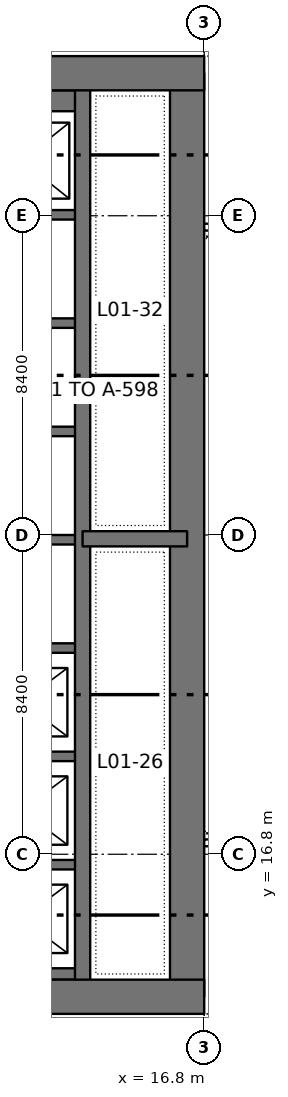
"""IFC4 building model, lengths in metres.
Left out: names, types, materials, properties, quantities, classifications, styles, units other than length and angle.
Written with IfcOpenShell. Run it as: python <this file> out.ifc"""

import sys

from ifc_helpers import new_model, si_unit, direction, frame, frame_2d, origin, place, context, subcontext, project, spatial, rectangle, extrude, element, save


model = new_model("IFC4")
c1 = context("Model", 3, precision=1e-05, world=origin(), true_north=direction((0.0, 1.0)))
c2 = subcontext(c1, "Body", "Model", "MODEL_VIEW")
j1 = project(units=[si_unit("LENGTHUNIT", "METRE"), si_unit("PLANEANGLEUNIT", "RADIAN")], contexts=[c1])
p1 = place(None, origin())
s1 = spatial("IfcSite", under=j1, at=p1, CompositionType="ELEMENT")
p2 = place(p1, origin())
s2 = spatial("IfcBuilding", under=s1, at=p2, CompositionType="ELEMENT")
p3 = place(p2, frame((0.0, 0.0, 5.4)))
s3 = spatial("IfcBuildingStorey", under=s2, at=p3, CompositionType="ELEMENT", Elevation=5.4)
p4 = place(p3, frame((-1.2, 13.05, 0.0), z_axis=(0.0, 0.0, 1.0), x_axis=(1.0, 0.0, 0.0)))
e1 = element("IfcWall", 1, at=p4, inside=s3, PredefinedType="SHEAR", context=c2, shape_type="SweptSolid", body=[
    extrude(rectangle(XDim=18.0, YDim=0.9, at=frame_2d((9.0, 0.0))), origin(), (0.0, 0.0, 1.0), 4.5),
])
p5 = place(p4, frame((8.95, 0.0, 0.0)))
e2 = element("IfcOpeningElement", 2, at=p5, cuts=e1, PredefinedType="OPENING", context=c2, shape_type="SweptSolid", body=[
    extrude(rectangle(XDim=1.8, YDim=2.4, at=frame_2d((0.9, 1.2))), frame((0.0, 0.46, 0.0), z_axis=(0.0, -1.0, 0.0), x_axis=(1.0, 0.0, 0.0)), (0.0, 0.0, 1.0), 0.92),
])
p6 = place(p3, frame((-1.2, 37.35, 0.0), z_axis=(0.0, 0.0, 1.0), x_axis=(1.0, 0.0, 0.0)))
e3 = element("IfcWall", 3, at=p6, inside=s3, PredefinedType="SHEAR", context=c2, shape_type="SweptSolid", body=[
    extrude(rectangle(XDim=18.0, YDim=0.9, at=frame_2d((9.0, 0.0))), origin(), (0.0, 0.0, 1.0), 4.5),
])
p7 = place(p6, frame((8.95, 0.0, 0.0)))
e4 = element("IfcOpeningElement", 4, at=p7, cuts=e3, PredefinedType="OPENING", context=c2, shape_type="SweptSolid", body=[
    extrude(rectangle(XDim=1.8, YDim=2.4, at=frame_2d((0.9, 1.2))), frame((0.0, 0.46, 0.0), z_axis=(0.0, -1.0, 0.0), x_axis=(1.0, 0.0, 0.0)), (0.0, 0.0, 1.0), 0.92),
])
p8 = place(p3, frame((16.35, 13.05, 0.0), z_axis=(0.0, 0.0, 1.0), x_axis=(0.0, 1.0, 0.0)))
e5 = element("IfcWall", 5, at=p8, inside=s3, PredefinedType="SHEAR", context=c2, shape_type="SweptSolid", body=[
    extrude(rectangle(XDim=24.3, YDim=0.9, at=frame_2d((12.15, 0.0))), origin(), (0.0, 0.0, 1.0), 4.5),
])
p9 = place(p3, frame((13.6, 13.05, 0.0), z_axis=(0.0, 0.0, 1.0), x_axis=(0.0, 1.0, 0.0)))
e6 = element("IfcWall", 6, at=p9, inside=s3, PredefinedType="SHEAR", context=c2, shape_type="SweptSolid", body=[
    extrude(rectangle(XDim=24.3, YDim=0.4, at=frame_2d((12.15, 0.0))), origin(), (0.0, 0.0, 1.0), 4.5),
])
p10 = place(p3, frame((13.6, 25.1, 0.0), z_axis=(0.0, 0.0, 1.0), x_axis=(1.0, 0.0, 0.0)))
e7 = element("IfcWall", 7, at=p10, inside=s3, PredefinedType="SHEAR", context=c2, shape_type="SweptSolid", body=[
    extrude(rectangle(XDim=2.75, YDim=0.4, at=frame_2d((1.375, 0.0))), origin(), (0.0, 0.0, 1.0), 4.5),
])
p11 = place(p3, frame((10.4, 13.65, 0.0), z_axis=(0.0, 0.0, 1.0), x_axis=(1.0, 0.0, 0.0)))
e8 = element("IfcWall", 8, at=p11, inside=s3, PredefinedType="SHEAR", context=c2, shape_type="SweptSolid", body=[
    extrude(rectangle(XDim=3.2, YDim=0.3, at=frame_2d((1.6, 0.0))), origin(), (0.0, 0.0, 1.0), 4.5),
])
for number, where, z_axis, x_axis in (
    (9, (10.4, 16.525, 0.0), (0.0, 0.0, 1.0), (1.0, 0.0, 0.0)),
    (10, (10.4, 19.375, 0.0), (0.0, 0.0, 1.0), (1.0, 0.0, 0.0)),
    (11, (10.4, 22.225, 0.0), (0.0, 0.0, 1.0), (1.0, 0.0, 0.0)),
    (12, (10.4, 25.075, 0.0), (0.0, 0.0, 1.0), (1.0, 0.0, 0.0)),
    (13, (10.4, 27.925, 0.0), (0.0, 0.0, 1.0), (1.0, 0.0, 0.0)),
    (14, (10.4, 30.775, 0.0), (0.0, 0.0, 1.0), (1.0, 0.0, 0.0)),
    (15, (10.4, 33.625, 0.0), (0.0, 0.0, 1.0), (1.0, 0.0, 0.0)),
):
    element("IfcWall", number, at=place(p3, frame(where, z_axis=z_axis, x_axis=x_axis)), inside=s3, PredefinedType="SHEAR", context=c2, shape_type="SweptSolid", body=[
        extrude(rectangle(XDim=3.2, YDim=0.25, at=frame_2d((1.6, 0.0))), origin(), (0.0, 0.0, 1.0), 4.5),
    ])
p12 = place(p3, frame((10.4, 36.625, 0.0), z_axis=(0.0, 0.0, 1.0), x_axis=(1.0, 0.0, 0.0)))
e16 = element("IfcWall", 16, at=p12, inside=s3, PredefinedType="SHEAR", context=c2, shape_type="SweptSolid", body=[
    extrude(rectangle(XDim=3.2, YDim=0.55, at=frame_2d((1.6, 0.0))), origin(), (0.0, 0.0, 1.0), 4.5),
])
save(model, sys.argv[1])
